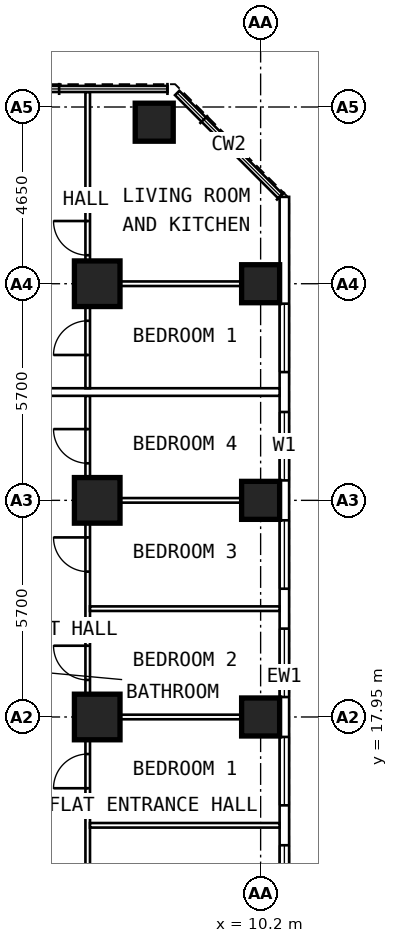
"""IFC4 building model, lengths in metres.
Left out: names, types, materials, properties, quantities, classifications, styles, units other than length and angle.
Written with IfcOpenShell. Run it as: python <this file> out.ifc"""

import sys

from ifc_helpers import new_model, si_unit, direction, frame, frame_2d, origin, origin_2d, place, context, subcontext, project, spatial, rectangle, extrude, element, fill, save


model = new_model("IFC4")
c1 = context("Model", 3, precision=1e-05, world=origin(), true_north=direction((0.0, 1.0)))
c2 = subcontext(c1, "Body", "Model", "MODEL_VIEW")
j1 = project(units=[si_unit("LENGTHUNIT", "METRE"), si_unit("PLANEANGLEUNIT", "RADIAN")], contexts=[c1])
p1 = place(None, origin())
s1 = spatial("IfcSite", under=j1, at=p1, CompositionType="ELEMENT")
p2 = place(p1, origin())
s2 = spatial("IfcBuilding", under=s1, at=p2, CompositionType="ELEMENT")
p3 = place(p2, frame((0.0, 0.0, 50.2)))
s3 = spatial("IfcBuildingStorey", under=s2, at=p3, CompositionType="ELEMENT", Elevation=50.2)
for number, where, z_axis, x_axis in (
    (1, (10.2, 17.95, 0.0), (0.0, 0.0, 1.0), (0.0, 1.0, 0.0)),
    (2, (10.2, 23.65, 0.0), (0.0, 0.0, 1.0), (0.0, 1.0, 0.0)),
    (3, (10.2, 29.35, 0.0), (0.0, 0.0, 1.0), (0.0, 1.0, 0.0)),
    (4, (7.4, 33.6, 0.0), (0.0, 0.0, 1.0), (0.0, 1.0, 0.0)),
):
    element("IfcColumn", number, at=place(p3, frame(where, z_axis=z_axis, x_axis=x_axis)), inside=s3, PredefinedType="COLUMN", context=c2, shape_type="SweptSolid", body=[
        extrude(rectangle(XDim=1.0, YDim=1.0, at=origin_2d()), origin(), (0.0, 0.0, 1.0), 3.6),
    ])
for number, where, z_axis, x_axis in (
    (5, (5.9, 17.95, 0.0), (0.0, 0.0, 1.0), (0.0, 1.0, 0.0)),
    (6, (5.9, 23.65, 0.0), (0.0, 0.0, 1.0), (0.0, 1.0, 0.0)),
    (7, (5.9, 29.35, 0.0), (0.0, 0.0, 1.0), (0.0, 1.0, 0.0)),
):
    element("IfcColumn", number, at=place(p3, frame(where, z_axis=z_axis, x_axis=x_axis)), inside=s3, PredefinedType="COLUMN", context=c2, shape_type="SweptSolid", body=[
        extrude(rectangle(XDim=1.2, YDim=1.2, at=origin_2d()), origin(), (0.0, 0.0, 1.0), 3.6),
    ])
p4 = place(p3, frame((10.825, 6.394, 0.0), z_axis=(0.0, 0.0, 1.0), x_axis=(0.0, 1.0, 0.0)))
e8 = element("IfcWall", 8, at=p4, inside=s3, PredefinedType="SOLIDWALL", context=c2, shape_type="SweptSolid", body=[
    extrude(rectangle(XDim=25.241, YDim=0.25, at=frame_2d((12.621, 0.0))), origin(), (0.0, 0.0, 1.0), 3.35),
])
p5 = place(p4, frame((0.681, 0.0, 0.8)))
e9 = element("IfcOpeningElement", 9, at=p5, cuts=e8, PredefinedType="OPENING", context=c2, shape_type="SweptSolid", body=[
    extrude(rectangle(XDim=1.8, YDim=1.8, at=frame_2d((0.9, 0.9))), frame((0.0, 0.137, 0.0), z_axis=(0.0, -1.0, 0.0), x_axis=(1.0, 0.0, 0.0)), (0.0, 0.0, 1.0), 0.274),
])
p6 = place(p4, frame((3.531, 0.0, 0.8)))
e10 = element("IfcOpeningElement", 10, at=p6, cuts=e8, PredefinedType="OPENING", context=c2, shape_type="SweptSolid", body=[
    extrude(rectangle(XDim=1.8, YDim=1.8, at=frame_2d((0.9, 0.9))), frame((0.0, 0.137, 0.0), z_axis=(0.0, -1.0, 0.0), x_axis=(1.0, 0.0, 0.0)), (0.0, 0.0, 1.0), 0.274),
])
p7 = place(p4, frame((6.381, 0.0, 0.8)))
e11 = element("IfcOpeningElement", 11, at=p7, cuts=e8, PredefinedType="OPENING", context=c2, shape_type="SweptSolid", body=[
    extrude(rectangle(XDim=1.8, YDim=1.8, at=frame_2d((0.9, 0.9))), frame((0.0, 0.137, 0.0), z_axis=(0.0, -1.0, 0.0), x_axis=(1.0, 0.0, 0.0)), (0.0, 0.0, 1.0), 0.274),
])
p8 = place(p4, frame((9.231, 0.0, 0.8)))
e12 = element("IfcOpeningElement", 12, at=p8, cuts=e8, PredefinedType="OPENING", context=c2, shape_type="SweptSolid", body=[
    extrude(rectangle(XDim=1.8, YDim=1.8, at=frame_2d((0.9, 0.9))), frame((0.0, 0.137, 0.0), z_axis=(0.0, -1.0, 0.0), x_axis=(1.0, 0.0, 0.0)), (0.0, 0.0, 1.0), 0.274),
])
p9 = place(p4, frame((12.081, 0.0, 0.8)))
e13 = element("IfcOpeningElement", 13, at=p9, cuts=e8, PredefinedType="OPENING", context=c2, shape_type="SweptSolid", body=[
    extrude(rectangle(XDim=1.8, YDim=1.8, at=frame_2d((0.9, 0.9))), frame((0.0, 0.137, 0.0), z_axis=(0.0, -1.0, 0.0), x_axis=(1.0, 0.0, 0.0)), (0.0, 0.0, 1.0), 0.274),
])
p10 = place(p4, frame((14.931, 0.0, 0.8)))
e14 = element("IfcOpeningElement", 14, at=p10, cuts=e8, PredefinedType="OPENING", context=c2, shape_type="SweptSolid", body=[
    extrude(rectangle(XDim=1.8, YDim=1.8, at=frame_2d((0.9, 0.9))), frame((0.0, 0.137, 0.0), z_axis=(0.0, -1.0, 0.0), x_axis=(1.0, 0.0, 0.0)), (0.0, 0.0, 1.0), 0.274),
])
p11 = place(p4, frame((17.781, 0.0, 0.8)))
e15 = element("IfcOpeningElement", 15, at=p11, cuts=e8, PredefinedType="OPENING", context=c2, shape_type="SweptSolid", body=[
    extrude(rectangle(XDim=1.8, YDim=1.8, at=frame_2d((0.9, 0.9))), frame((0.0, 0.137, 0.0), z_axis=(0.0, -1.0, 0.0), x_axis=(1.0, 0.0, 0.0)), (0.0, 0.0, 1.0), 0.274),
])
p12 = place(p4, frame((20.631, 0.0, 0.8)))
e16 = element("IfcOpeningElement", 16, at=p12, cuts=e8, PredefinedType="OPENING", context=c2, shape_type="SweptSolid", body=[
    extrude(rectangle(XDim=1.8, YDim=1.8, at=frame_2d((0.9, 0.9))), frame((0.0, 0.137, 0.0), z_axis=(0.0, -1.0, 0.0), x_axis=(1.0, 0.0, 0.0)), (0.0, 0.0, 1.0), 0.274),
])
p13 = place(p3, frame((5.65, 9.6, 0.0), z_axis=(0.0, 0.0, 1.0), x_axis=(0.0, 1.0, 0.0)))
e17 = element("IfcWall", 17, at=p13, inside=s3, PredefinedType="PARTITIONING", context=c2, shape_type="SweptSolid", body=[
    extrude(rectangle(XDim=16.8, YDim=0.12, at=frame_2d((8.4, 0.0))), origin(), (0.0, 0.0, 1.0), 3.35),
])
p14 = place(p13, frame((3.4, 0.0, 0.0)))
e18 = element("IfcOpeningElement", 18, at=p14, cuts=e17, PredefinedType="OPENING", context=c2, shape_type="SweptSolid", body=[
    extrude(rectangle(XDim=0.9, YDim=2.1, at=frame_2d((0.45, 1.05))), frame((0.0, 0.072, 0.0), z_axis=(0.0, -1.0, 0.0), x_axis=(1.0, 0.0, 0.0)), (0.0, 0.0, 1.0), 0.144),
])
p15 = place(p13, frame((6.475, 0.0, 0.0)))
e19 = element("IfcOpeningElement", 19, at=p15, cuts=e17, PredefinedType="OPENING", context=c2, shape_type="SweptSolid", body=[
    extrude(rectangle(XDim=0.9, YDim=2.1, at=frame_2d((0.45, 1.05))), frame((0.0, 0.072, 0.0), z_axis=(0.0, -1.0, 0.0), x_axis=(1.0, 0.0, 0.0)), (0.0, 0.0, 1.0), 0.144),
])
p16 = place(p13, frame((9.325, 0.0, 0.0)))
e20 = element("IfcOpeningElement", 20, at=p16, cuts=e17, PredefinedType="OPENING", context=c2, shape_type="SweptSolid", body=[
    extrude(rectangle(XDim=0.9, YDim=2.1, at=frame_2d((0.45, 1.05))), frame((0.0, 0.072, 0.0), z_axis=(0.0, -1.0, 0.0), x_axis=(1.0, 0.0, 0.0)), (0.0, 0.0, 1.0), 0.144),
])
p17 = place(p13, frame((12.175, 0.0, 0.0)))
e21 = element("IfcOpeningElement", 21, at=p17, cuts=e17, PredefinedType="OPENING", context=c2, shape_type="SweptSolid", body=[
    extrude(rectangle(XDim=0.9, YDim=2.1, at=frame_2d((0.45, 1.05))), frame((0.0, 0.072, 0.0), z_axis=(0.0, -1.0, 0.0), x_axis=(1.0, 0.0, 0.0)), (0.0, 0.0, 1.0), 0.144),
])
p18 = place(p13, frame((15.025, 0.0, 0.0)))
e22 = element("IfcOpeningElement", 22, at=p18, cuts=e17, PredefinedType="OPENING", context=c2, shape_type="SweptSolid", body=[
    extrude(rectangle(XDim=0.9, YDim=2.1, at=frame_2d((0.45, 1.05))), frame((0.0, 0.072, 0.0), z_axis=(0.0, -1.0, 0.0), x_axis=(1.0, 0.0, 0.0)), (0.0, 0.0, 1.0), 0.144),
])
p19 = place(p3, frame((5.71, 15.1, 0.0), z_axis=(0.0, 0.0, 1.0), x_axis=(1.0, 0.0, 0.0)))
e23 = element("IfcWall", 23, at=p19, inside=s3, PredefinedType="PARTITIONING", context=c2, shape_type="SweptSolid", body=[
    extrude(rectangle(XDim=4.99, YDim=0.12, at=frame_2d((2.495, 0.0))), origin(), (0.0, 0.0, 1.0), 3.35),
])
p20 = place(p3, frame((5.71, 17.95, 0.0), z_axis=(0.0, 0.0, 1.0), x_axis=(1.0, 0.0, 0.0)))
e24 = element("IfcWall", 24, at=p20, inside=s3, PredefinedType="PARTITIONING", context=c2, shape_type="SweptSolid", body=[
    extrude(rectangle(XDim=4.99, YDim=0.12, at=frame_2d((2.495, 0.0))), origin(), (0.0, 0.0, 1.0), 2.45),
])
p21 = place(p3, frame((5.71, 20.8, 0.0), z_axis=(0.0, 0.0, 1.0), x_axis=(1.0, 0.0, 0.0)))
e25 = element("IfcWall", 25, at=p21, inside=s3, PredefinedType="PARTITIONING", context=c2, shape_type="SweptSolid", body=[
    extrude(rectangle(XDim=4.99, YDim=0.12, at=frame_2d((2.495, 0.0))), origin(), (0.0, 0.0, 1.0), 3.35),
])
p22 = place(p3, frame((5.71, 23.65, 0.0), z_axis=(0.0, 0.0, 1.0), x_axis=(1.0, 0.0, 0.0)))
e26 = element("IfcWall", 26, at=p22, inside=s3, PredefinedType="PARTITIONING", context=c2, shape_type="SweptSolid", body=[
    extrude(rectangle(XDim=4.99, YDim=0.12, at=frame_2d((2.495, 0.0))), origin(), (0.0, 0.0, 1.0), 2.45),
])
p23 = place(p3, frame((5.65, 26.6, 0.0), z_axis=(0.0, 0.0, 1.0), x_axis=(0.0, 1.0, 0.0)))
e27 = element("IfcWall", 27, at=p23, inside=s3, PredefinedType="PARTITIONING", context=c2, shape_type="SweptSolid", body=[
    extrude(rectangle(XDim=7.795, YDim=0.12, at=frame_2d((3.897, 0.0))), origin(), (0.0, 0.0, 1.0), 3.35),
])
p24 = place(p23, frame((0.875, 0.0, 0.0)))
e28 = element("IfcOpeningElement", 28, at=p24, cuts=e27, PredefinedType="OPENING", context=c2, shape_type="SweptSolid", body=[
    extrude(rectangle(XDim=0.9, YDim=2.1, at=frame_2d((0.45, 1.05))), frame((0.0, 0.072, 0.0), z_axis=(0.0, -1.0, 0.0), x_axis=(1.0, 0.0, 0.0)), (0.0, 0.0, 1.0), 0.144),
])
p25 = place(p23, frame((3.5, 0.0, 0.0)))
e29 = element("IfcOpeningElement", 29, at=p25, cuts=e27, PredefinedType="OPENING", context=c2, shape_type="SweptSolid", body=[
    extrude(rectangle(XDim=0.9, YDim=2.1, at=frame_2d((0.45, 1.05))), frame((0.0, 0.072, 0.0), z_axis=(0.0, -1.0, 0.0), x_axis=(1.0, 0.0, 0.0)), (0.0, 0.0, 1.0), 0.144),
])
p26 = place(p3, frame((5.71, 29.35, 0.0), z_axis=(0.0, 0.0, 1.0), x_axis=(1.0, 0.0, 0.0)))
e30 = element("IfcWall", 30, at=p26, inside=s3, PredefinedType="PARTITIONING", context=c2, shape_type="SweptSolid", body=[
    extrude(rectangle(XDim=4.99, YDim=0.12, at=frame_2d((2.495, 0.0))), origin(), (0.0, 0.0, 1.0), 2.45),
])
p27 = place(p3, frame((2.1, 26.5, 0.0), z_axis=(0.0, 0.0, 1.0), x_axis=(1.0, 0.0, 0.0)))
e31 = element("IfcWall", 31, at=p27, inside=s3, PredefinedType="PARTITIONING", context=c2, shape_type="SweptSolid", body=[
    extrude(rectangle(XDim=8.6, YDim=0.2, at=frame_2d((4.3, 0.0))), origin(), (0.0, 0.0, 1.0), 3.35),
])
p28 = place(p7, origin())
e32 = element("IfcWindow", 32, at=p28, inside=s3, PartitioningType="SINGLE_PANEL", PredefinedType="WINDOW", context=c2, shape_type="SweptSolid", body=[
    extrude(rectangle(XDim=1.8, YDim=1.8, at=frame_2d((0.9, 0.9))), frame((0.0, 0.03, 0.0), z_axis=(0.0, -1.0, 0.0), x_axis=(1.0, 0.0, 0.0)), (0.0, 0.0, 1.0), 0.06),
])
fill(e11, e32)
p29 = place(p8, origin())
e33 = element("IfcWindow", 33, at=p29, inside=s3, PartitioningType="SINGLE_PANEL", PredefinedType="WINDOW", context=c2, shape_type="SweptSolid", body=[
    extrude(rectangle(XDim=1.8, YDim=1.8, at=frame_2d((0.9, 0.9))), frame((0.0, 0.03, 0.0), z_axis=(0.0, -1.0, 0.0), x_axis=(1.0, 0.0, 0.0)), (0.0, 0.0, 1.0), 0.06),
])
fill(e12, e33)
p30 = place(p9, origin())
e34 = element("IfcWindow", 34, at=p30, inside=s3, PartitioningType="SINGLE_PANEL", PredefinedType="WINDOW", context=c2, shape_type="SweptSolid", body=[
    extrude(rectangle(XDim=1.8, YDim=1.8, at=frame_2d((0.9, 0.9))), frame((0.0, 0.03, 0.0), z_axis=(0.0, -1.0, 0.0), x_axis=(1.0, 0.0, 0.0)), (0.0, 0.0, 1.0), 0.06),
])
fill(e13, e34)
p31 = place(p10, origin())
e35 = element("IfcWindow", 35, at=p31, inside=s3, PartitioningType="SINGLE_PANEL", PredefinedType="WINDOW", context=c2, shape_type="SweptSolid", body=[
    extrude(rectangle(XDim=1.8, YDim=1.8, at=frame_2d((0.9, 0.9))), frame((0.0, 0.03, 0.0), z_axis=(0.0, -1.0, 0.0), x_axis=(1.0, 0.0, 0.0)), (0.0, 0.0, 1.0), 0.06),
])
fill(e14, e35)
p32 = place(p11, origin())
e36 = element("IfcWindow", 36, at=p32, inside=s3, PartitioningType="SINGLE_PANEL", PredefinedType="WINDOW", context=c2, shape_type="SweptSolid", body=[
    extrude(rectangle(XDim=1.8, YDim=1.8, at=frame_2d((0.9, 0.9))), frame((0.0, 0.03, 0.0), z_axis=(0.0, -1.0, 0.0), x_axis=(1.0, 0.0, 0.0)), (0.0, 0.0, 1.0), 0.06),
])
fill(e15, e36)
p33 = place(p12, origin())
e37 = element("IfcWindow", 37, at=p33, inside=s3, PartitioningType="SINGLE_PANEL", PredefinedType="WINDOW", context=c2, shape_type="SweptSolid", body=[
    extrude(rectangle(XDim=1.8, YDim=1.8, at=frame_2d((0.9, 0.9))), frame((0.0, 0.03, 0.0), z_axis=(0.0, -1.0, 0.0), x_axis=(1.0, 0.0, 0.0)), (0.0, 0.0, 1.0), 0.06),
])
fill(e16, e37)
p34 = place(p15, origin())
e38 = element("IfcDoor", 38, at=p34, inside=s3, OperationType="SINGLE_SWING_LEFT", PredefinedType="DOOR", context=c2, shape_type="SweptSolid", body=[
    extrude(rectangle(XDim=0.9, YDim=2.1, at=frame_2d((0.45, 1.05))), frame((0.0, 0.025, 0.0), z_axis=(0.0, -1.0, 0.0), x_axis=(1.0, 0.0, 0.0)), (0.0, 0.0, 1.0), 0.05),
])
fill(e19, e38)
p35 = place(p16, origin())
e39 = element("IfcDoor", 39, at=p35, inside=s3, OperationType="SINGLE_SWING_RIGHT", PredefinedType="DOOR", context=c2, shape_type="SweptSolid", body=[
    extrude(rectangle(XDim=0.9, YDim=2.1, at=frame_2d((0.45, 1.05))), frame((0.0, 0.025, 0.0), z_axis=(0.0, -1.0, 0.0), x_axis=(1.0, 0.0, 0.0)), (0.0, 0.0, 1.0), 0.05),
])
fill(e20, e39)
p36 = place(p17, origin())
e40 = element("IfcDoor", 40, at=p36, inside=s3, OperationType="SINGLE_SWING_RIGHT", PredefinedType="DOOR", context=c2, shape_type="SweptSolid", body=[
    extrude(rectangle(XDim=0.9, YDim=2.1, at=frame_2d((0.45, 1.05))), frame((0.0, 0.025, 0.0), z_axis=(0.0, -1.0, 0.0), x_axis=(1.0, 0.0, 0.0)), (0.0, 0.0, 1.0), 0.05),
])
fill(e21, e40)
p37 = place(p18, origin())
e41 = element("IfcDoor", 41, at=p37, inside=s3, OperationType="SINGLE_SWING_RIGHT", PredefinedType="DOOR", context=c2, shape_type="SweptSolid", body=[
    extrude(rectangle(XDim=0.9, YDim=2.1, at=frame_2d((0.45, 1.05))), frame((0.0, 0.025, 0.0), z_axis=(0.0, -1.0, 0.0), x_axis=(1.0, 0.0, 0.0)), (0.0, 0.0, 1.0), 0.05),
])
fill(e22, e41)
p38 = place(p24, origin())
e42 = element("IfcDoor", 42, at=p38, inside=s3, OperationType="SINGLE_SWING_LEFT", PredefinedType="DOOR", context=c2, shape_type="SweptSolid", body=[
    extrude(rectangle(XDim=0.9, YDim=2.1, at=frame_2d((0.45, 1.05))), frame((0.0, 0.025, 0.0), z_axis=(0.0, -1.0, 0.0), x_axis=(1.0, 0.0, 0.0)), (0.0, 0.0, 1.0), 0.05),
])
fill(e28, e42)
p39 = place(p25, origin())
e43 = element("IfcDoor", 43, at=p39, inside=s3, OperationType="SINGLE_SWING_RIGHT", PredefinedType="DOOR", context=c2, shape_type="SweptSolid", body=[
    extrude(rectangle(XDim=0.9, YDim=2.1, at=frame_2d((0.45, 1.05))), frame((0.0, 0.025, 0.0), z_axis=(0.0, -1.0, 0.0), x_axis=(1.0, 0.0, 0.0)), (0.0, 0.0, 1.0), 0.05),
])
fill(e29, e43)
save(model, sys.argv[1])
